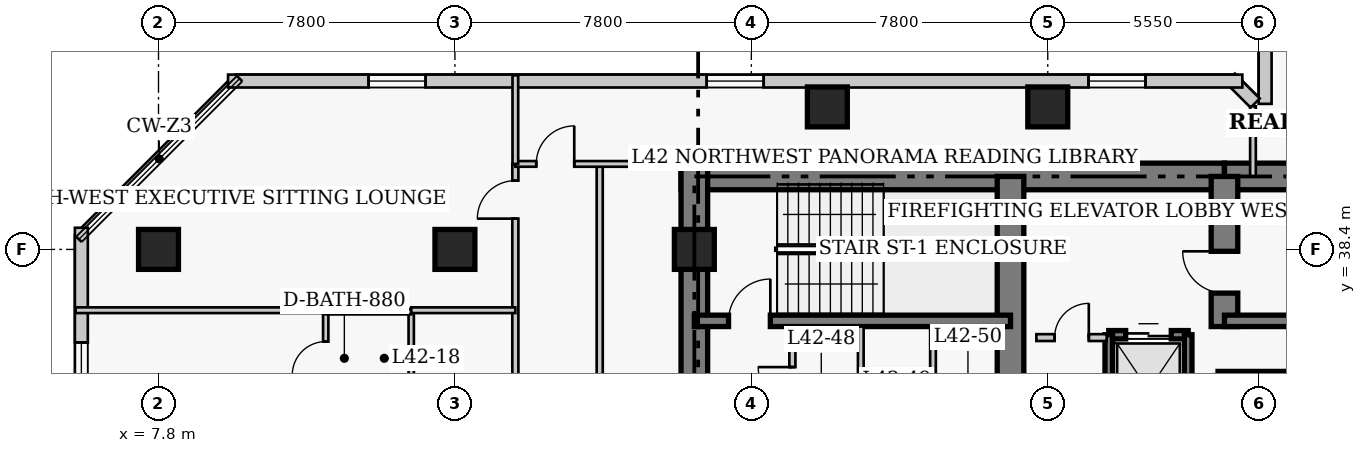
"""IFC4 building model, lengths in metres.
Left out: names, types, materials, properties, quantities, classifications, styles, units other than length and angle.
Written with IfcOpenShell. Run it as: python <this file> out.ifc"""

import sys

from ifc_helpers import new_model, si_unit, direction, frame, frame_2d, origin, origin_2d, place, context, subcontext, project, spatial, rectangle, extrude, element, fill, save


model = new_model("IFC4")
c1 = context("Model", 3, precision=1e-05, world=origin(), true_north=direction((0.0, 1.0)))
c2 = subcontext(c1, "Body", "Model", "MODEL_VIEW")
j1 = project(units=[si_unit("LENGTHUNIT", "METRE"), si_unit("PLANEANGLEUNIT", "RADIAN")], contexts=[c1])
p1 = place(None, origin())
s1 = spatial("IfcSite", under=j1, at=p1, CompositionType="ELEMENT")
p2 = place(p1, origin())
s2 = spatial("IfcBuilding", under=s1, at=p2, CompositionType="ELEMENT")
p3 = place(p2, frame((0.0, 0.0, 168.8)))
s3 = spatial("IfcBuildingStorey", under=s2, at=p3, CompositionType="ELEMENT", Elevation=168.8)
p4 = place(p3, frame((21.55, 40.32, 0.0), z_axis=(0.0, 0.0, 1.0), x_axis=(1.0, 0.0, 0.0)))
e1 = element("IfcWall", 1, at=p4, inside=s3, PredefinedType="SHEAR", context=c2, shape_type="SweptSolid", body=[
    extrude(rectangle(XDim=14.3, YDim=0.7, at=frame_2d((7.15, 0.0))), origin(), (0.0, 0.0, 1.0), 3.8),
])
p5 = place(p3, frame((35.85, 40.32, 0.0), z_axis=(0.0, 0.0, 1.0), x_axis=(1.0, 0.0, 0.0)))
e2 = element("IfcWall", 2, at=p5, inside=s3, PredefinedType="SHEAR", context=c2, shape_type="SweptSolid", body=[
    extrude(rectangle(XDim=12.6, YDim=0.7, at=frame_2d((6.3, 0.0))), origin(), (0.0, 0.0, 1.0), 3.8),
])
p6 = place(p3, frame((21.9, 27.05, 0.0), z_axis=(0.0, 0.0, 1.0), x_axis=(0.0, 1.0, 0.0)))
e3 = element("IfcWall", 3, at=p6, inside=s3, PredefinedType="SHEAR", context=c2, shape_type="SweptSolid", body=[
    extrude(rectangle(XDim=13.62, YDim=0.7, at=frame_2d((6.81, 0.0))), origin(), (0.0, 0.0, 1.0), 3.8),
])
p7 = place(p3, frame((30.22, 33.1, 0.0), z_axis=(0.0, 0.0, 1.0), x_axis=(0.0, 1.0, 0.0)))
e4 = element("IfcWall", 4, at=p7, inside=s3, PredefinedType="SHEAR", context=c2, shape_type="SweptSolid", body=[
    extrude(rectangle(XDim=7.22, YDim=0.7, at=frame_2d((3.61, 0.0))), origin(), (0.0, 0.0, 1.0), 3.8),
])
p8 = place(p3, frame((35.85, 36.37, 0.0), z_axis=(0.0, 0.0, 1.0), x_axis=(0.0, 1.0, 0.0)))
e5 = element("IfcWall", 5, at=p8, inside=s3, PredefinedType="SHEAR", context=c2, shape_type="SweptSolid", body=[
    extrude(rectangle(XDim=3.95, YDim=0.7, at=frame_2d((1.975, 0.0))), origin(), (0.0, 0.0, 1.0), 3.8),
])
p9 = place(p8, frame((0.88, 0.0, 0.0)))
e6 = element("IfcOpeningElement", 6, at=p9, cuts=e5, PredefinedType="OPENING", context=c2, shape_type="SweptSolid", body=[
    extrude(rectangle(XDim=1.1, YDim=2.15, at=frame_2d((0.55, 1.075))), frame((0.0, 0.36, 0.0), z_axis=(0.0, -1.0, 0.0), x_axis=(1.0, 0.0, 0.0)), (0.0, 0.0, 1.0), 0.72),
])
p10 = place(p3, frame((21.9, 36.52, 0.0), z_axis=(0.0, 0.0, 1.0), x_axis=(1.0, 0.0, 0.0)))
e7 = element("IfcWall", 7, at=p10, inside=s3, PredefinedType="SHEAR", context=c2, shape_type="SweptSolid", body=[
    extrude(rectangle(XDim=8.32, YDim=0.3, at=frame_2d((4.16, 0.0))), origin(), (0.0, 0.0, 1.0), 3.8),
])
p11 = place(p10, frame((0.9, 0.0, 0.0)))
e8 = element("IfcOpeningElement", 8, at=p11, cuts=e7, PredefinedType="OPENING", context=c2, shape_type="SweptSolid", body=[
    extrude(rectangle(XDim=1.1, YDim=2.15, at=frame_2d((0.55, 1.075))), frame((0.0, 0.16, 0.0), z_axis=(0.0, -1.0, 0.0), x_axis=(1.0, 0.0, 0.0)), (0.0, 0.0, 1.0), 0.32),
])
p12 = place(p3, frame((35.85, 36.52, 0.0), z_axis=(0.0, 0.0, 1.0), x_axis=(1.0, 0.0, 0.0)))
e9 = element("IfcWall", 9, at=p12, inside=s3, PredefinedType="SHEAR", context=c2, shape_type="SweptSolid", body=[
    extrude(rectangle(XDim=8.33, YDim=0.3, at=frame_2d((4.165, 0.0))), origin(), (0.0, 0.0, 1.0), 3.8),
])
for number, where, z_axis, x_axis in (
    (10, (7.8, 38.4, 0.0), (0.0, 0.0, 1.0), (1.0, 0.0, 0.0)),
    (11, (15.6, 38.4, 0.0), (0.0, 0.0, 1.0), (1.0, 0.0, 0.0)),
    (12, (21.9, 38.4, 0.0), (0.0, 0.0, 1.0), (1.0, 0.0, 0.0)),
    (13, (25.4, 42.15, 0.0), (0.0, 0.0, 1.0), (1.0, 0.0, 0.0)),
    (14, (31.2, 42.15, 0.0), (0.0, 0.0, 1.0), (1.0, 0.0, 0.0)),
):
    element("IfcColumn", number, at=place(p3, frame(where, z_axis=z_axis, x_axis=x_axis)), inside=s3, PredefinedType="COLUMN", context=c2, shape_type="SweptSolid", body=[
        extrude(rectangle(XDim=1.05, YDim=1.05, at=origin_2d()), origin(), (0.0, 0.0, 1.0), 3.8),
    ])
p13 = place(p3, frame((36.92, 44.37, 0.0), z_axis=(0.0, 0.0, 1.0), x_axis=(0.0, -1.0, 0.0)))
e15 = element("IfcWall", 15, at=p13, inside=s3, PredefinedType="SOLIDWALL", context=c2, shape_type="SweptSolid", body=[
    extrude(rectangle(XDim=2.14, YDim=0.34, at=frame_2d((1.07, 0.0))), origin(), (0.0, 0.0, 1.0), 3.55),
])
p14 = place(p3, frame((36.658, 42.251, 0.0), z_axis=(0.0, 0.0, 1.0), x_axis=(-0.707106781187, 0.707106781187, 0.0)))
e16 = element("IfcWall", 16, at=p14, inside=s3, PredefinedType="SOLIDWALL", context=c2, shape_type="SweptSolid", body=[
    extrude(rectangle(XDim=0.929, YDim=0.34, at=frame_2d((0.464, 0.0))), origin(), (0.0, 0.0, 1.0), 3.55),
])
p15 = place(p3, frame((36.32, 42.83, 0.0), z_axis=(0.0, 0.0, 1.0), x_axis=(-1.0, 0.0, 0.0)))
e17 = element("IfcWall", 17, at=p15, inside=s3, PredefinedType="SOLIDWALL", context=c2, shape_type="SweptSolid", body=[
    extrude(rectangle(XDim=26.69, YDim=0.34, at=frame_2d((13.345, 0.0))), origin(), (0.0, 0.0, 1.0), 3.55),
])
p16 = place(p15, frame((2.548, 0.0, 0.85)))
e18 = element("IfcOpeningElement", 18, at=p16, cuts=e17, PredefinedType="OPENING", context=c2, shape_type="SweptSolid", body=[
    extrude(rectangle(XDim=1.5, YDim=1.75, at=frame_2d((0.75, 0.875))), frame((0.0, 0.18, 0.0), z_axis=(0.0, -1.0, 0.0), x_axis=(1.0, 0.0, 0.0)), (0.0, 0.0, 1.0), 0.36),
])
p17 = place(p15, frame((12.595, 0.0, 0.85)))
e19 = element("IfcOpeningElement", 19, at=p17, cuts=e17, PredefinedType="OPENING", context=c2, shape_type="SweptSolid", body=[
    extrude(rectangle(XDim=1.5, YDim=1.75, at=frame_2d((0.75, 0.875))), frame((0.0, 0.18, 0.0), z_axis=(0.0, -1.0, 0.0), x_axis=(1.0, 0.0, 0.0)), (0.0, 0.0, 1.0), 0.36),
])
p18 = place(p15, frame((21.492, 0.0, 0.85)))
e20 = element("IfcOpeningElement", 20, at=p18, cuts=e17, PredefinedType="OPENING", context=c2, shape_type="SweptSolid", body=[
    extrude(rectangle(XDim=1.5, YDim=1.75, at=frame_2d((0.75, 0.875))), frame((0.0, 0.18, 0.0), z_axis=(0.0, -1.0, 0.0), x_axis=(1.0, 0.0, 0.0)), (0.0, 0.0, 1.0), 0.36),
])
p19 = place(p3, frame((5.77, 38.97, 0.0), z_axis=(0.0, 0.0, 1.0), x_axis=(0.0, -1.0, 0.0)))
e21 = element("IfcWall", 21, at=p19, inside=s3, PredefinedType="SOLIDWALL", context=c2, shape_type="SweptSolid", body=[
    extrude(rectangle(XDim=30.14, YDim=0.34, at=frame_2d((15.07, 0.0))), origin(), (0.0, 0.0, 1.0), 3.55),
])
p20 = place(p19, frame((3.018, 0.0, 0.85)))
e22 = element("IfcOpeningElement", 22, at=p20, cuts=e21, PredefinedType="OPENING", context=c2, shape_type="SweptSolid", body=[
    extrude(rectangle(XDim=1.5, YDim=1.75, at=frame_2d((0.75, 0.875))), frame((0.0, 0.18, 0.0), z_axis=(0.0, -1.0, 0.0), x_axis=(1.0, 0.0, 0.0)), (0.0, 0.0, 1.0), 0.36),
])
p21 = place(p19, frame((10.552, 0.0, 0.85)))
e23 = element("IfcOpeningElement", 23, at=p21, cuts=e21, PredefinedType="OPENING", context=c2, shape_type="SweptSolid", body=[
    extrude(rectangle(XDim=1.5, YDim=1.75, at=frame_2d((0.75, 0.875))), frame((0.0, 0.18, 0.0), z_axis=(0.0, -1.0, 0.0), x_axis=(1.0, 0.0, 0.0)), (0.0, 0.0, 1.0), 0.36),
])
p22 = place(p19, frame((16.938, 0.0, 0.85)))
e24 = element("IfcOpeningElement", 24, at=p22, cuts=e21, PredefinedType="OPENING", context=c2, shape_type="SweptSolid", body=[
    extrude(rectangle(XDim=1.5, YDim=1.75, at=frame_2d((0.75, 0.875))), frame((0.0, 0.18, 0.0), z_axis=(0.0, -1.0, 0.0), x_axis=(1.0, 0.0, 0.0)), (0.0, 0.0, 1.0), 0.36),
])
p23 = place(p19, frame((25.623, 0.0, 0.85)))
e25 = element("IfcOpeningElement", 25, at=p23, cuts=e21, PredefinedType="OPENING", context=c2, shape_type="SweptSolid", body=[
    extrude(rectangle(XDim=1.5, YDim=1.75, at=frame_2d((0.75, 0.875))), frame((0.0, 0.18, 0.0), z_axis=(0.0, -1.0, 0.0), x_axis=(1.0, 0.0, 0.0)), (0.0, 0.0, 1.0), 0.36),
])
p24 = place(p3, frame((35.68, 35.08, 0.0), z_axis=(0.0, 0.0, 1.0), x_axis=(1.0, 0.0, 0.0)))
e26 = element("IfcWall", 26, at=p24, inside=s3, PredefinedType="SHEAR", context=c2, shape_type="SweptSolid", body=[
    extrude(rectangle(XDim=2.32, YDim=0.22, at=frame_2d((1.16, 0.0))), origin(), (0.0, 0.0, 1.0), 3.8),
])
p25 = place(p3, frame((32.805, 36.155, 0.0), z_axis=(0.0, 0.0, 1.0), x_axis=(1.0, 0.0, 0.0)))
e27 = element("IfcWall", 27, at=p25, inside=s3, PredefinedType="SHEAR", context=c2, shape_type="SweptSolid", body=[
    extrude(rectangle(XDim=2.09, YDim=0.22, at=frame_2d((1.045, 0.0))), origin(), (0.0, 0.0, 1.0), 3.8),
])
p26 = place(p25, frame((0.445, 0.0, 0.0)))
e28 = element("IfcOpeningElement", 28, at=p26, cuts=e27, PredefinedType="OPENING", context=c2, shape_type="SweptSolid", body=[
    extrude(rectangle(XDim=1.2, YDim=2.15, at=frame_2d((0.6, 1.075))), frame((0.0, 0.12, 0.0), z_axis=(0.0, -1.0, 0.0), x_axis=(1.0, 0.0, 0.0)), (0.0, 0.0, 1.0), 0.24),
])
for number, where, z_axis, x_axis in (
    (29, (32.805, 33.245, 0.0), (0.0, 0.0, 1.0), (0.0, 1.0, 0.0)),
    (30, (34.895, 33.245, 0.0), (0.0, 0.0, 1.0), (0.0, 1.0, 0.0)),
):
    element("IfcWall", number, at=place(p3, frame(where, z_axis=z_axis, x_axis=x_axis)), inside=s3, PredefinedType="SHEAR", context=c2, shape_type="SweptSolid", body=[
        extrude(rectangle(XDim=2.91, YDim=0.2, at=frame_2d((1.455, 0.0))), origin(), (0.0, 0.0, 1.0), 3.8),
    ])
p27 = place(p3, frame((30.9, 36.08, 0.0), z_axis=(0.0, 0.0, 1.0), x_axis=(1.0, 0.0, 0.0)))
e31 = element("IfcWall", 31, at=p27, inside=s3, PredefinedType="PARTITIONING", context=c2, shape_type="SweptSolid", body=[
    extrude(rectangle(XDim=1.85, YDim=0.18, at=frame_2d((0.925, 0.0))), origin(), (0.0, 0.0, 1.0), 3.55),
])
p28 = place(p27, frame((0.48, 0.0, 0.0)))
e32 = element("IfcOpeningElement", 32, at=p28, cuts=e31, PredefinedType="OPENING", context=c2, shape_type="SweptSolid", body=[
    extrude(rectangle(XDim=0.9, YDim=2.15, at=frame_2d((0.45, 1.075))), frame((0.0, 0.1, 0.0), z_axis=(0.0, -1.0, 0.0), x_axis=(1.0, 0.0, 0.0)), (0.0, 0.0, 1.0), 0.2),
])
p29 = place(p3, frame((24.48, 32.8, 0.0), z_axis=(0.0, 0.0, 1.0), x_axis=(0.0, 1.0, 0.0)))
e33 = element("IfcWall", 33, at=p29, inside=s3, PredefinedType="PARTITIONING", context=c2, shape_type="SweptSolid", body=[
    extrude(rectangle(XDim=3.57, YDim=0.16, at=frame_2d((1.785, 0.0))), origin(), (0.0, 0.0, 1.0), 3.55),
])
p30 = place(p29, frame((1.604, 0.0, 0.0)))
e34 = element("IfcOpeningElement", 34, at=p30, cuts=e33, PredefinedType="OPENING", context=c2, shape_type="SweptSolid", body=[
    extrude(rectangle(XDim=0.9, YDim=2.1, at=frame_2d((0.45, 1.05))), frame((0.0, 0.09, 0.0), z_axis=(0.0, -1.0, 0.0), x_axis=(1.0, 0.0, 0.0)), (0.0, 0.0, 1.0), 0.18),
])
for number, where, z_axis, x_axis in (
    (35, (26.28, 32.75, 0.0), (0.0, 0.0, 1.0), (0.0, 1.0, 0.0)),
    (36, (28.18, 32.75, 0.0), (0.0, 0.0, 1.0), (0.0, 1.0, 0.0)),
):
    element("IfcWall", number, at=place(p3, frame(where, z_axis=z_axis, x_axis=x_axis)), inside=s3, PredefinedType="PARTITIONING", context=c2, shape_type="SweptSolid", body=[
        extrude(rectangle(XDim=3.62, YDim=0.15, at=frame_2d((1.81, 0.0))), origin(), (0.0, 0.0, 1.0), 3.55),
    ])
p31 = place(p3, frame((17.19, 6.85, 0.0), z_axis=(0.0, 0.0, 1.0), x_axis=(0.0, 1.0, 0.0)))
e37 = element("IfcWall", 37, at=p31, inside=s3, PredefinedType="PARTITIONING", context=c2, shape_type="SweptSolid", body=[
    extrude(rectangle(XDim=33.8, YDim=0.16, at=frame_2d((16.9, 0.0))), origin(), (0.0, 0.0, 1.0), 3.55),
])
p32 = place(p31, frame((1.7, 0.0, 0.0)))
e38 = element("IfcOpeningElement", 38, at=p32, cuts=e37, PredefinedType="OPENING", context=c2, shape_type="SweptSolid", body=[
    extrude(rectangle(XDim=0.95, YDim=2.1, at=frame_2d((0.475, 1.05))), frame((0.0, 0.09, 0.0), z_axis=(0.0, -1.0, 0.0), x_axis=(1.0, 0.0, 0.0)), (0.0, 0.0, 1.0), 0.18),
])
p33 = place(p31, frame((8.275, 0.0, 0.0)))
e39 = element("IfcOpeningElement", 39, at=p33, cuts=e37, PredefinedType="OPENING", context=c2, shape_type="SweptSolid", body=[
    extrude(rectangle(XDim=0.95, YDim=2.1, at=frame_2d((0.475, 1.05))), frame((0.0, 0.09, 0.0), z_axis=(0.0, -1.0, 0.0), x_axis=(1.0, 0.0, 0.0)), (0.0, 0.0, 1.0), 0.18),
])
p34 = place(p31, frame((14.543, 0.0, 0.0)))
e40 = element("IfcOpeningElement", 40, at=p34, cuts=e37, PredefinedType="OPENING", context=c2, shape_type="SweptSolid", body=[
    extrude(rectangle(XDim=0.95, YDim=2.1, at=frame_2d((0.475, 1.05))), frame((0.0, 0.09, 0.0), z_axis=(0.0, -1.0, 0.0), x_axis=(1.0, 0.0, 0.0)), (0.0, 0.0, 1.0), 0.18),
])
p35 = place(p31, frame((32.36, 0.0, 0.0)))
e41 = element("IfcOpeningElement", 41, at=p35, cuts=e37, PredefinedType="OPENING", context=c2, shape_type="SweptSolid", body=[
    extrude(rectangle(XDim=1.0, YDim=2.15, at=frame_2d((0.5, 1.075))), frame((0.0, 0.09, 0.0), z_axis=(0.0, -1.0, 0.0), x_axis=(1.0, 0.0, 0.0)), (0.0, 0.0, 1.0), 0.18),
])
p36 = place(p3, frame((19.41, 35.02, 0.0), z_axis=(0.0, 0.0, 1.0), x_axis=(0.0, 1.0, 0.0)))
e42 = element("IfcWall", 42, at=p36, inside=s3, PredefinedType="PARTITIONING", context=c2, shape_type="SweptSolid", body=[
    extrude(rectangle(XDim=5.63, YDim=0.16, at=frame_2d((2.815, 0.0))), origin(), (0.0, 0.0, 1.0), 3.55),
])
p37 = place(p3, frame((17.19, 40.65, 0.0), z_axis=(0.0, 0.0, 1.0), x_axis=(1.0, 0.0, 0.0)))
e43 = element("IfcWall", 43, at=p37, inside=s3, PredefinedType="PARTITIONING", context=c2, shape_type="SweptSolid", body=[
    extrude(rectangle(XDim=4.91, YDim=0.15, at=frame_2d((2.455, 0.0))), origin(), (0.0, 0.0, 1.0), 3.55),
])
p38 = place(p37, frame((0.55, 0.0, 0.0)))
e44 = element("IfcOpeningElement", 44, at=p38, cuts=e43, PredefinedType="OPENING", context=c2, shape_type="SweptSolid", body=[
    extrude(rectangle(XDim=1.0, YDim=2.15, at=frame_2d((0.5, 1.075))), frame((0.0, 0.085, 0.0), z_axis=(0.0, -1.0, 0.0), x_axis=(1.0, 0.0, 0.0)), (0.0, 0.0, 1.0), 0.17),
])
p39 = place(p3, frame((17.19, 40.65, 0.0), z_axis=(0.0, 0.0, 1.0), x_axis=(0.0, 1.0, 0.0)))
e45 = element("IfcWall", 45, at=p39, inside=s3, PredefinedType="PARTITIONING", context=c2, shape_type="SweptSolid", body=[
    extrude(rectangle(XDim=2.33, YDim=0.15, at=frame_2d((1.165, 0.0))), origin(), (0.0, 0.0, 1.0), 3.55),
])
p40 = place(p3, frame((36.6, 40.32, 0.0), z_axis=(0.0, 0.0, 1.0), x_axis=(0.0, 1.0, 0.0)))
e46 = element("IfcWall", 46, at=p40, inside=s3, PredefinedType="PARTITIONING", context=c2, shape_type="SweptSolid", body=[
    extrude(rectangle(XDim=1.845, YDim=0.15, at=frame_2d((0.922, 0.0))), origin(), (0.0, 0.0, 1.0), 3.55),
])
p41 = place(p3, frame((12.2, 34.31, 0.0), z_axis=(0.0, 0.0, 1.0), x_axis=(0.0, 1.0, 0.0)))
e47 = element("IfcWall", 47, at=p41, inside=s3, PredefinedType="PLUMBINGWALL", context=c2, shape_type="SweptSolid", body=[
    extrude(rectangle(XDim=2.45, YDim=0.14, at=frame_2d((1.225, 0.0))), origin(), (0.0, 0.0, 1.0), 3.55),
])
p42 = place(p41, frame((0.785, 0.0, 0.0)))
e48 = element("IfcOpeningElement", 48, at=p42, cuts=e47, PredefinedType="OPENING", context=c2, shape_type="SweptSolid", body=[
    extrude(rectangle(XDim=0.88, YDim=2.05, at=frame_2d((0.44, 1.025))), frame((0.0, 0.08, 0.0), z_axis=(0.0, -1.0, 0.0), x_axis=(1.0, 0.0, 0.0)), (0.0, 0.0, 1.0), 0.16),
])
p43 = place(p3, frame((14.45, 34.31, 0.0), z_axis=(0.0, 0.0, 1.0), x_axis=(0.0, 1.0, 0.0)))
e49 = element("IfcWall", 49, at=p43, inside=s3, PredefinedType="PLUMBINGWALL", context=c2, shape_type="SweptSolid", body=[
    extrude(rectangle(XDim=2.45, YDim=0.14, at=frame_2d((1.225, 0.0))), origin(), (0.0, 0.0, 1.0), 3.55),
])
p44 = place(p3, frame((12.2, 36.76, 0.0), z_axis=(0.0, 0.0, 1.0), x_axis=(1.0, 0.0, 0.0)))
e50 = element("IfcWall", 50, at=p44, inside=s3, PredefinedType="PLUMBINGWALL", context=c2, shape_type="SweptSolid", body=[
    extrude(rectangle(XDim=2.25, YDim=0.14, at=frame_2d((1.125, 0.0))), origin(), (0.0, 0.0, 1.0), 3.55),
])
p45 = place(p3, frame((5.62, 36.8, 0.0), z_axis=(0.0, 0.0, 1.0), x_axis=(1.0, 0.0, 0.0)))
e51 = element("IfcWall", 51, at=p45, inside=s3, PredefinedType="PARTITIONING", context=c2, shape_type="SweptSolid", body=[
    extrude(rectangle(XDim=6.58, YDim=0.15, at=frame_2d((3.29, 0.0))), origin(), (0.0, 0.0, 1.0), 3.55),
])
p46 = place(p3, frame((14.45, 36.8, 0.0), z_axis=(0.0, 0.0, 1.0), x_axis=(1.0, 0.0, 0.0)))
e52 = element("IfcWall", 52, at=p46, inside=s3, PredefinedType="PARTITIONING", context=c2, shape_type="SweptSolid", body=[
    extrude(rectangle(XDim=2.74, YDim=0.15, at=frame_2d((1.37, 0.0))), origin(), (0.0, 0.0, 1.0), 3.55),
])
p47 = place(p16, origin())
e53 = element("IfcWindow", 53, at=p47, inside=s3, PartitioningType="SINGLE_PANEL", PredefinedType="WINDOW", context=c2, shape_type="SweptSolid", body=[
    extrude(rectangle(XDim=1.5, YDim=1.75, at=frame_2d((0.75, 0.875))), frame((0.0, 0.03, 0.0), z_axis=(0.0, -1.0, 0.0), x_axis=(1.0, 0.0, 0.0)), (0.0, 0.0, 1.0), 0.06),
])
fill(e18, e53)
p48 = place(p17, origin())
e54 = element("IfcWindow", 54, at=p48, inside=s3, PartitioningType="SINGLE_PANEL", PredefinedType="WINDOW", context=c2, shape_type="SweptSolid", body=[
    extrude(rectangle(XDim=1.5, YDim=1.75, at=frame_2d((0.75, 0.875))), frame((0.0, 0.03, 0.0), z_axis=(0.0, -1.0, 0.0), x_axis=(1.0, 0.0, 0.0)), (0.0, 0.0, 1.0), 0.06),
])
fill(e19, e54)
p49 = place(p18, origin())
e55 = element("IfcWindow", 55, at=p49, inside=s3, PartitioningType="SINGLE_PANEL", PredefinedType="WINDOW", context=c2, shape_type="SweptSolid", body=[
    extrude(rectangle(XDim=1.5, YDim=1.75, at=frame_2d((0.75, 0.875))), frame((0.0, 0.03, 0.0), z_axis=(0.0, -1.0, 0.0), x_axis=(1.0, 0.0, 0.0)), (0.0, 0.0, 1.0), 0.06),
])
fill(e20, e55)
p50 = place(p20, origin())
e56 = element("IfcWindow", 56, at=p50, inside=s3, PartitioningType="SINGLE_PANEL", PredefinedType="WINDOW", context=c2, shape_type="SweptSolid", body=[
    extrude(rectangle(XDim=1.5, YDim=1.75, at=frame_2d((0.75, 0.875))), frame((0.0, 0.03, 0.0), z_axis=(0.0, -1.0, 0.0), x_axis=(1.0, 0.0, 0.0)), (0.0, 0.0, 1.0), 0.06),
])
fill(e22, e56)
p51 = place(p26, origin())
e57 = element("IfcDoor", 57, at=p51, inside=s3, OperationType="DOUBLE_DOOR_SLIDING", PredefinedType="DOOR", context=c2, shape_type="SweptSolid", body=[
    extrude(rectangle(XDim=1.2, YDim=2.15, at=frame_2d((0.6, 1.075))), frame((0.0, 0.025, 0.0), z_axis=(0.0, -1.0, 0.0), x_axis=(1.0, 0.0, 0.0)), (0.0, 0.0, 1.0), 0.05),
])
fill(e28, e57)
p52 = place(p28, origin())
e58 = element("IfcDoor", 58, at=p52, inside=s3, OperationType="SINGLE_SWING_RIGHT", PredefinedType="DOOR", context=c2, shape_type="SweptSolid", body=[
    extrude(rectangle(XDim=0.9, YDim=2.15, at=frame_2d((0.45, 1.075))), frame((0.0, 0.025, 0.0), z_axis=(0.0, -1.0, 0.0), x_axis=(1.0, 0.0, 0.0)), (0.0, 0.0, 1.0), 0.05),
])
fill(e32, e58)
p53 = place(p30, origin())
e59 = element("IfcDoor", 59, at=p53, inside=s3, OperationType="SINGLE_SWING_RIGHT", PredefinedType="DOOR", context=c2, shape_type="SweptSolid", body=[
    extrude(rectangle(XDim=0.9, YDim=2.1, at=frame_2d((0.45, 1.05))), frame((0.0, 0.025, 0.0), z_axis=(0.0, -1.0, 0.0), x_axis=(1.0, 0.0, 0.0)), (0.0, 0.0, 1.0), 0.05),
])
fill(e34, e59)
p54 = place(p38, origin())
e60 = element("IfcDoor", 60, at=p54, inside=s3, OperationType="SINGLE_SWING_RIGHT", PredefinedType="DOOR", context=c2, shape_type="SweptSolid", body=[
    extrude(rectangle(XDim=1.0, YDim=2.15, at=frame_2d((0.5, 1.075))), frame((0.0, 0.025, 0.0), z_axis=(0.0, -1.0, 0.0), x_axis=(1.0, 0.0, 0.0)), (0.0, 0.0, 1.0), 0.05),
])
fill(e44, e60)
p55 = place(p42, origin())
e61 = element("IfcDoor", 61, at=p55, inside=s3, OperationType="SINGLE_SWING_LEFT", PredefinedType="DOOR", context=c2, shape_type="SweptSolid", body=[
    extrude(rectangle(XDim=0.88, YDim=2.05, at=frame_2d((0.44, 1.025))), frame((0.0, 0.025, 0.0), z_axis=(0.0, -1.0, 0.0), x_axis=(1.0, 0.0, 0.0)), (0.0, 0.0, 1.0), 0.05),
])
fill(e48, e61)
p56 = place(p35, origin())
e62 = element("IfcDoor", 62, at=p56, inside=s3, OperationType="SINGLE_SWING_LEFT", PredefinedType="DOOR", context=c2, shape_type="SweptSolid", body=[
    extrude(rectangle(XDim=1.0, YDim=2.15, at=frame_2d((0.5, 1.075))), frame((0.0, 0.025, 0.0), z_axis=(0.0, -1.0, 0.0), x_axis=(1.0, 0.0, 0.0)), (0.0, 0.0, 1.0), 0.05),
])
fill(e41, e62)
p57 = place(p11, origin())
e63 = element("IfcDoor", 63, at=p57, inside=s3, OperationType="SINGLE_SWING_RIGHT", PredefinedType="DOOR", context=c2, shape_type="SweptSolid", body=[
    extrude(rectangle(XDim=1.1, YDim=2.15, at=frame_2d((0.55, 1.075))), frame((0.0, 0.025, 0.0), z_axis=(0.0, -1.0, 0.0), x_axis=(1.0, 0.0, 0.0)), (0.0, 0.0, 1.0), 0.05),
])
fill(e8, e63)
p58 = place(p9, origin())
e64 = element("IfcDoor", 64, at=p58, inside=s3, OperationType="SINGLE_SWING_RIGHT", PredefinedType="DOOR", context=c2, shape_type="SweptSolid", body=[
    extrude(rectangle(XDim=1.1, YDim=2.15, at=frame_2d((0.55, 1.075))), frame((0.0, 0.025, 0.0), z_axis=(0.0, -1.0, 0.0), x_axis=(1.0, 0.0, 0.0)), (0.0, 0.0, 1.0), 0.05),
])
fill(e6, e64)
save(model, sys.argv[1])
